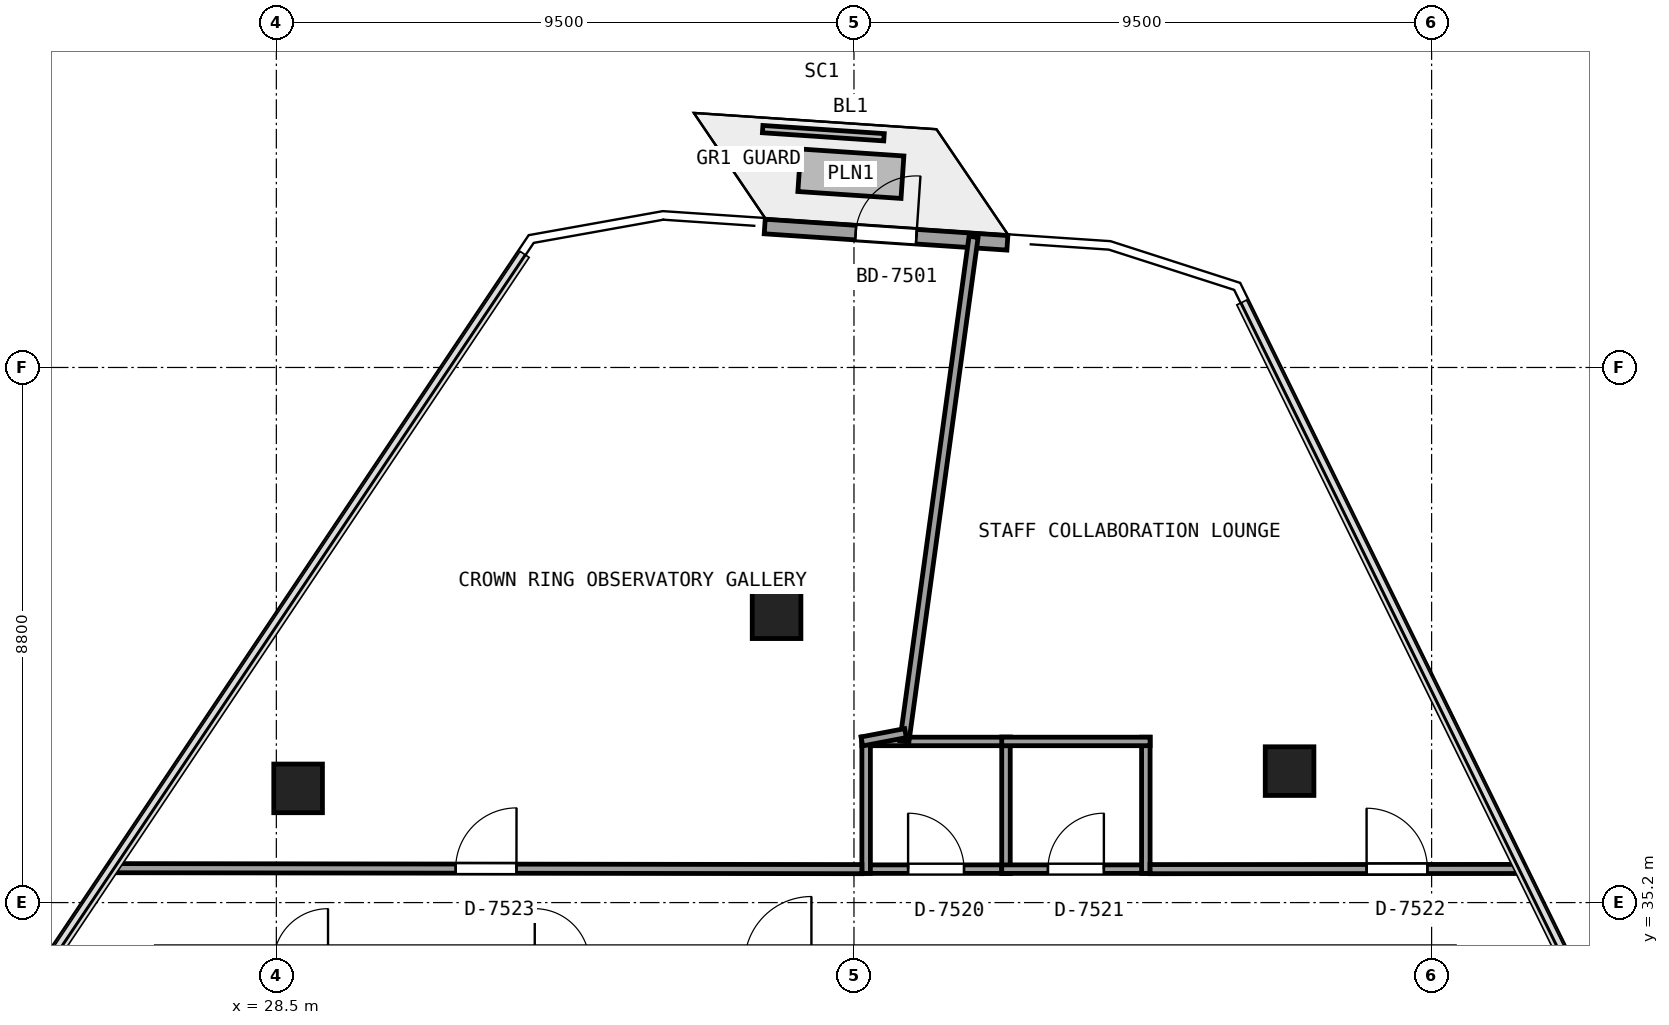
"""IFC4 building model, lengths in metres.
Left out: names, types, materials, properties, quantities, classifications, styles, units other than length and angle.
Written with IfcOpenShell. Run it as: python <this file> out.ifc"""

import sys

from ifc_helpers import new_model, si_unit, direction, frame, frame_2d, origin, origin_2d, place, context, subcontext, project, spatial, rectangle, extrude, element, fill, save


model = new_model("IFC4")
c1 = context("Model", 3, precision=1e-05, world=origin(), true_north=direction((0.0, 1.0)))
c2 = subcontext(c1, "Body", "Model", "MODEL_VIEW")
j1 = project(units=[si_unit("LENGTHUNIT", "METRE"), si_unit("PLANEANGLEUNIT", "RADIAN")], contexts=[c1])
p1 = place(None, origin())
s1 = spatial("IfcSite", under=j1, at=p1, CompositionType="ELEMENT")
p2 = place(p1, origin())
s2 = spatial("IfcBuilding", under=s1, at=p2, CompositionType="ELEMENT")
p3 = place(p2, frame((0.0, 0.0, 279.3)))
s3 = spatial("IfcBuildingStorey", under=s2, at=p3, CompositionType="ELEMENT", Elevation=279.3)
for number, where, z_axis, x_axis in (
    (1, (45.164, 37.362, 0.0), (0.0, 0.0, 1.0), (1.0, 0.0, 0.0)),
    (2, (36.727, 39.942, 0.0), (0.0, 0.0, 1.0), (1.0, 0.0, 0.0)),
    (3, (28.858, 37.078, 0.0), (0.0, 0.0, 1.0), (1.0, 0.0, 0.0)),
):
    element("IfcColumn", number, at=place(p3, frame(where, z_axis=z_axis, x_axis=x_axis)), inside=s3, PredefinedType="COLUMN", context=c2, shape_type="SweptSolid", body=[
        extrude(rectangle(XDim=0.8, YDim=0.8, at=origin_2d()), origin(), (0.0, 0.0, 1.0), 3.84),
    ])
p4 = place(p3, frame((36.532, 46.318, 0.0), z_axis=(0.0, 0.0, 1.0), x_axis=(0.997751814855, -0.067017281012, 0.0)))
e4 = element("IfcWall", 4, at=p4, inside=s3, PredefinedType="SOLIDWALL", context=c2, shape_type="SweptSolid", body=[
    extrude(rectangle(XDim=4.0, YDim=0.24, at=frame_2d((2.0, 0.0))), origin(), (0.0, 0.0, 1.0), 3.84),
])
p5 = place(p4, frame((1.5, 0.0, 0.0)))
e5 = element("IfcOpeningElement", 5, at=p5, cuts=e4, PredefinedType="OPENING", context=c2, shape_type="SweptSolid", body=[
    extrude(rectangle(XDim=1.0, YDim=2.15, at=frame_2d((0.5, 1.075))), frame((0.0, 0.13, 0.0), z_axis=(0.0, -1.0, 0.0), x_axis=(1.0, 0.0, 0.0)), (0.0, 0.0, 1.0), 0.26),
])
p6 = place(p3, frame((38.13, 35.75, 0.0), z_axis=(0.0, 0.0, 1.0), x_axis=(1.0, 0.0, 0.0)))
e6 = element("IfcWall", 6, at=p6, inside=s3, PredefinedType="PARTITIONING", context=c2, shape_type="SweptSolid", body=[
    extrude(rectangle(XDim=2.44, YDim=0.14, at=frame_2d((1.22, 0.0))), origin(), (0.0, 0.0, 1.0), 3.84),
])
p7 = place(p6, frame((0.76, 0.0, 0.0)))
e7 = element("IfcOpeningElement", 7, at=p7, cuts=e6, PredefinedType="OPENING", context=c2, shape_type="SweptSolid", body=[
    extrude(rectangle(XDim=0.92, YDim=2.1, at=frame_2d((0.46, 1.05))), frame((0.0, 0.08, 0.0), z_axis=(0.0, -1.0, 0.0), x_axis=(1.0, 0.0, 0.0)), (0.0, 0.0, 1.0), 0.16),
])
p8 = place(p3, frame((40.5, 35.68, 0.0), z_axis=(0.0, 0.0, 1.0), x_axis=(0.0, 1.0, 0.0)))
e8 = element("IfcWall", 8, at=p8, inside=s3, PredefinedType="PARTITIONING", context=c2, shape_type="SweptSolid", body=[
    extrude(rectangle(XDim=2.24, YDim=0.14, at=frame_2d((1.12, 0.0))), origin(), (0.0, 0.0, 1.0), 3.513),
])
p9 = place(p3, frame((40.57, 37.85, 0.0), z_axis=(0.0, 0.0, 1.0), x_axis=(-1.0, 0.0, 0.0)))
e9 = element("IfcWall", 9, at=p9, inside=s3, PredefinedType="PARTITIONING", context=c2, shape_type="SweptSolid", body=[
    extrude(rectangle(XDim=2.44, YDim=0.14, at=frame_2d((1.22, 0.0))), origin(), (0.0, 0.0, 1.0), 3.84),
])
p10 = place(p3, frame((38.2, 37.92, 0.0), z_axis=(0.0, 0.0, 1.0), x_axis=(0.0, -1.0, 0.0)))
e10 = element("IfcWall", 10, at=p10, inside=s3, PredefinedType="PARTITIONING", context=c2, shape_type="SweptSolid", body=[
    extrude(rectangle(XDim=2.24, YDim=0.14, at=frame_2d((1.12, 0.0))), origin(), (0.0, 0.0, 1.0), 3.513),
])
p11 = place(p3, frame((40.43, 35.75, 0.0), z_axis=(0.0, 0.0, 1.0), x_axis=(1.0, 0.0, 0.0)))
e11 = element("IfcWall", 11, at=p11, inside=s3, PredefinedType="PARTITIONING", context=c2, shape_type="SweptSolid", body=[
    extrude(rectangle(XDim=2.44, YDim=0.14, at=frame_2d((1.22, 0.0))), origin(), (0.0, 0.0, 1.0), 3.513),
])
p12 = place(p11, frame((0.76, 0.0, 0.0)))
e12 = element("IfcOpeningElement", 12, at=p12, cuts=e11, PredefinedType="OPENING", context=c2, shape_type="SweptSolid", body=[
    extrude(rectangle(XDim=0.92, YDim=2.1, at=frame_2d((0.46, 1.05))), frame((0.0, 0.08, 0.0), z_axis=(0.0, -1.0, 0.0), x_axis=(1.0, 0.0, 0.0)), (0.0, 0.0, 1.0), 0.16),
])
p13 = place(p3, frame((42.8, 35.68, 0.0), z_axis=(0.0, 0.0, 1.0), x_axis=(0.0, 1.0, 0.0)))
e13 = element("IfcWall", 13, at=p13, inside=s3, PredefinedType="PARTITIONING", context=c2, shape_type="SweptSolid", body=[
    extrude(rectangle(XDim=2.24, YDim=0.14, at=frame_2d((1.12, 0.0))), origin(), (0.0, 0.0, 1.0), 3.513),
])
p14 = place(p3, frame((42.87, 37.85, 0.0), z_axis=(0.0, 0.0, 1.0), x_axis=(-1.0, 0.0, 0.0)))
e14 = element("IfcWall", 14, at=p14, inside=s3, PredefinedType="PARTITIONING", context=c2, shape_type="SweptSolid", body=[
    extrude(rectangle(XDim=2.44, YDim=0.14, at=frame_2d((1.22, 0.0))), origin(), (0.0, 0.0, 1.0), 3.84),
])
p15 = place(p3, frame((39.967, 46.148, 0.0), z_axis=(0.0, 0.0, 1.0), x_axis=(-0.135865017465, -0.990727357566, 0.0)))
e15 = element("IfcWall", 15, at=p15, inside=s3, PredefinedType="PARTITIONING", context=c2, shape_type="SweptSolid", body=[
    extrude(rectangle(XDim=8.375, YDim=0.15, at=frame_2d((4.188, 0.0))), origin(), (0.0, 0.0, 1.0), 3.365),
])
p16 = place(p3, frame((42.87, 35.75, 0.0), z_axis=(0.0, 0.0, 1.0), x_axis=(0.999999885753, 0.000478011418, 0.0)))
e16 = element("IfcWall", 16, at=p16, inside=s3, PredefinedType="PARTITIONING", context=c2, shape_type="SweptSolid", body=[
    extrude(rectangle(XDim=6.129, YDim=0.15, at=frame_2d((3.064, 0.0))), origin(), (0.0, 0.0, 1.0), 3.289),
])
p17 = place(p16, frame((3.561, 0.0, 0.0)))
e17 = element("IfcOpeningElement", 17, at=p17, cuts=e16, PredefinedType="OPENING", context=c2, shape_type="SweptSolid", body=[
    extrude(rectangle(XDim=1.0, YDim=2.15, at=frame_2d((0.5, 1.075))), frame((0.0, 0.085, 0.0), z_axis=(0.0, -1.0, 0.0), x_axis=(1.0, 0.0, 0.0)), (0.0, 0.0, 1.0), 0.17),
])
p18 = place(p3, frame((25.767, 35.766, 0.0), z_axis=(0.0, 0.0, 1.0), x_axis=(0.999999150616, -0.001303367904, 0.0)))
e18 = element("IfcWall", 18, at=p18, inside=s3, PredefinedType="PARTITIONING", context=c2, shape_type="SweptSolid", body=[
    extrude(rectangle(XDim=12.363, YDim=0.15, at=frame_2d((6.181, 0.0))), origin(), (0.0, 0.0, 1.0), 3.289),
])
p19 = place(p18, frame((5.682, 0.0, 0.0)))
e19 = element("IfcOpeningElement", 19, at=p19, cuts=e18, PredefinedType="OPENING", context=c2, shape_type="SweptSolid", body=[
    extrude(rectangle(XDim=1.0, YDim=2.15, at=frame_2d((0.5, 1.075))), frame((0.0, 0.085, 0.0), z_axis=(0.0, -1.0, 0.0), x_axis=(1.0, 0.0, 0.0)), (0.0, 0.0, 1.0), 0.17),
])
p20 = place(p3, frame((38.13, 37.85, 0.0), z_axis=(0.0, 0.0, 1.0), x_axis=(0.982288834003, 0.187373014579, 0.0)))
e20 = element("IfcWall", 20, at=p20, inside=s3, PredefinedType="PARTITIONING", context=c2, shape_type="SweptSolid", body=[
    extrude(rectangle(XDim=0.731, YDim=0.15, at=frame_2d((0.365, 0.0))), origin(), (0.0, 0.0, 1.0), 3.84),
])
p21 = place(p5, origin())
e21 = element("IfcDoor", 21, at=p21, inside=s3, OperationType="SINGLE_SWING_RIGHT", PredefinedType="DOOR", context=c2, shape_type="SweptSolid", body=[
    extrude(rectangle(XDim=1.0, YDim=2.15, at=frame_2d((0.5, 1.075))), frame((0.0, 0.025, 0.0), z_axis=(0.0, -1.0, 0.0), x_axis=(1.0, 0.0, 0.0)), (0.0, 0.0, 1.0), 0.05),
])
fill(e5, e21)
p22 = place(p7, origin())
e22 = element("IfcDoor", 22, at=p22, inside=s3, OperationType="SINGLE_SWING_LEFT", PredefinedType="DOOR", context=c2, shape_type="SweptSolid", body=[
    extrude(rectangle(XDim=0.92, YDim=2.1, at=frame_2d((0.46, 1.05))), frame((0.0, 0.025, 0.0), z_axis=(0.0, -1.0, 0.0), x_axis=(1.0, 0.0, 0.0)), (0.0, 0.0, 1.0), 0.05),
])
fill(e7, e22)
p23 = place(p12, origin())
e23 = element("IfcDoor", 23, at=p23, inside=s3, OperationType="SINGLE_SWING_RIGHT", PredefinedType="DOOR", context=c2, shape_type="SweptSolid", body=[
    extrude(rectangle(XDim=0.92, YDim=2.1, at=frame_2d((0.46, 1.05))), frame((0.0, 0.025, 0.0), z_axis=(0.0, -1.0, 0.0), x_axis=(1.0, 0.0, 0.0)), (0.0, 0.0, 1.0), 0.05),
])
fill(e12, e23)
p24 = place(p17, origin())
e24 = element("IfcDoor", 24, at=p24, inside=s3, OperationType="SINGLE_SWING_LEFT", PredefinedType="DOOR", context=c2, shape_type="SweptSolid", body=[
    extrude(rectangle(XDim=1.0, YDim=2.15, at=frame_2d((0.5, 1.075))), frame((0.0, 0.025, 0.0), z_axis=(0.0, -1.0, 0.0), x_axis=(1.0, 0.0, 0.0)), (0.0, 0.0, 1.0), 0.05),
])
fill(e17, e24)
p25 = place(p19, origin())
e25 = element("IfcDoor", 25, at=p25, inside=s3, OperationType="SINGLE_SWING_RIGHT", PredefinedType="DOOR", context=c2, shape_type="SweptSolid", body=[
    extrude(rectangle(XDim=1.0, YDim=2.15, at=frame_2d((0.5, 1.075))), frame((0.0, 0.025, 0.0), z_axis=(0.0, -1.0, 0.0), x_axis=(1.0, 0.0, 0.0)), (0.0, 0.0, 1.0), 0.05),
])
fill(e19, e25)
save(model, sys.argv[1])
